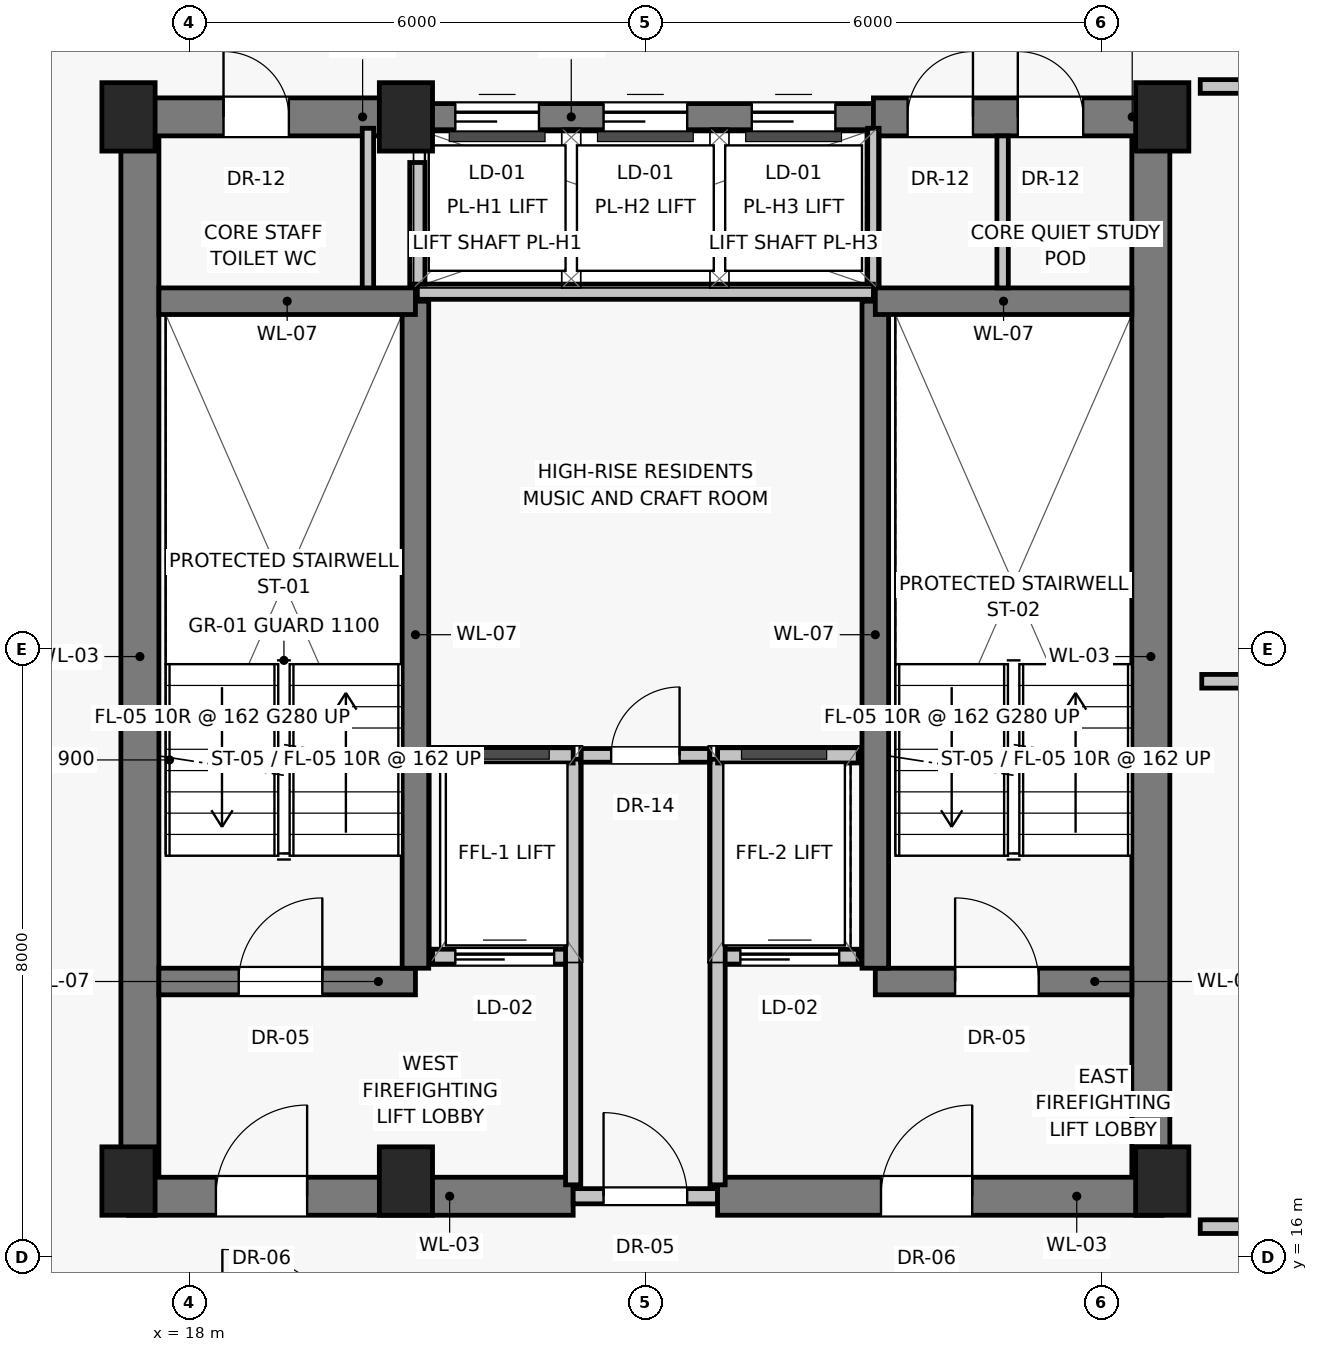
"""IFC4 building model, lengths in metres.
Left out: names, types, materials, properties, quantities, classifications, styles, units other than length and angle.
Written with IfcOpenShell. Run it as: python <this file> out.ifc"""

import sys

from ifc_helpers import new_model, si_unit, direction, frame, frame_2d, origin, origin_2d, place, context, subcontext, project, spatial, rectangle, extrude, source, transform, mapped, element, fill, save


model = new_model("IFC4")
c1 = context("Model", 3, precision=1e-05, world=origin(), true_north=direction((0.0, 1.0)))
c2 = subcontext(c1, "Body", "Model", "MODEL_VIEW")
j1 = project(units=[si_unit("LENGTHUNIT", "METRE"), si_unit("PLANEANGLEUNIT", "RADIAN")], contexts=[c1])
p1 = place(None, origin())
s1 = spatial("IfcSite", under=j1, at=p1, CompositionType="ELEMENT")
p2 = place(p1, origin())
s2 = spatial("IfcBuilding", under=s1, at=p2, CompositionType="ELEMENT")
p3 = place(p2, frame((0.0, 0.0, 244.75)))
s3 = spatial("IfcBuildingStorey", under=s2, at=p3, CompositionType="ELEMENT", Elevation=244.75)
for number, where, z_axis, x_axis in (
    (1, (17.2, 17.0, 0.0), (0.0, 0.0, 1.0), (1.0, 0.0, 0.0)),
    (2, (20.85, 17.0, 0.0), (0.0, 0.0, 1.0), (1.0, 0.0, 0.0)),
    (3, (30.8, 17.0, 0.0), (0.0, 0.0, 1.0), (1.0, 0.0, 0.0)),
    (4, (17.2, 31.0, 0.0), (0.0, 0.0, 1.0), (1.0, 0.0, 0.0)),
    (5, (20.85, 31.0, 0.0), (0.0, 0.0, 1.0), (1.0, 0.0, 0.0)),
    (6, (30.8, 31.0, 0.0), (0.0, 0.0, 1.0), (1.0, 0.0, 0.0)),
):
    element("IfcColumn", number, at=place(p3, frame(where, z_axis=z_axis, x_axis=x_axis)), inside=s3, PredefinedType="PILASTER", context=c2, shape_type="SweptSolid", body=[
        extrude(rectangle(XDim=0.7, YDim=0.9, at=origin_2d()), origin(), (0.0, 0.0, 1.0), 3.25),
    ])
for number, where, z_axis, x_axis in (
    (7, (17.35, 16.8, 0.0), (0.0, 0.0, 1.0), (0.0, 1.0, 0.0)),
    (8, (30.65, 16.8, 0.0), (0.0, 0.0, 1.0), (0.0, 1.0, 0.0)),
):
    element("IfcWall", number, at=place(p3, frame(where, z_axis=z_axis, x_axis=x_axis)), inside=s3, PredefinedType="SHEAR", context=c2, shape_type="SweptSolid", body=[
        extrude(rectangle(XDim=14.2, YDim=0.5, at=frame_2d((7.1, 0.0))), origin(), (0.0, 0.0, 1.0), 3.015),
    ])
p4 = place(p3, frame((17.2, 16.8, 0.0), z_axis=(0.0, 0.0, 1.0), x_axis=(1.0, 0.0, 0.0)))
e9 = element("IfcWall", 9, at=p4, inside=s3, PredefinedType="SHEAR", context=c2, shape_type="SweptSolid", body=[
    extrude(rectangle(XDim=5.85, YDim=0.5, at=frame_2d((2.925, 0.0))), origin(), (0.0, 0.0, 1.0), 3.015),
])
p5 = place(p4, frame((1.15, 0.0, 0.0)))
e10 = element("IfcOpeningElement", 10, at=p5, cuts=e9, PredefinedType="OPENING", context=c2, shape_type="SweptSolid", body=[
    extrude(rectangle(XDim=1.2, YDim=2.03, at=frame_2d((0.6, 1.015))), frame((0.0, 0.26, 0.0), z_axis=(0.0, -1.0, 0.0), x_axis=(1.0, 0.0, 0.0)), (0.0, 0.0, 1.0), 0.52),
])
p6 = place(p3, frame((23.05, 16.8, 0.0), z_axis=(0.0, 0.0, 1.0), x_axis=(1.0, 0.0, 0.0)))
e11 = element("IfcWall", 11, at=p6, inside=s3, PredefinedType="SOLIDWALL", context=c2, shape_type="SweptSolid", body=[
    extrude(rectangle(XDim=1.9, YDim=0.2, at=frame_2d((0.95, 0.0))), origin(), (0.0, 0.0, 1.0), 2.165),
])
p7 = place(p6, frame((0.4, 0.0, 0.0)))
e12 = element("IfcOpeningElement", 12, at=p7, cuts=e11, PredefinedType="OPENING", context=c2, shape_type="SweptSolid", body=[
    extrude(rectangle(XDim=1.1, YDim=2.03, at=frame_2d((0.55, 1.015))), frame((0.0, 0.11, 0.0), z_axis=(0.0, -1.0, 0.0), x_axis=(1.0, 0.0, 0.0)), (0.0, 0.0, 1.0), 0.22),
])
p8 = place(p3, frame((24.95, 16.8, 0.0), z_axis=(0.0, 0.0, 1.0), x_axis=(1.0, 0.0, 0.0)))
e13 = element("IfcWall", 13, at=p8, inside=s3, PredefinedType="SHEAR", context=c2, shape_type="SweptSolid", body=[
    extrude(rectangle(XDim=5.85, YDim=0.5, at=frame_2d((2.925, 0.0))), origin(), (0.0, 0.0, 1.0), 3.015),
])
p9 = place(p8, frame((2.15, 0.0, 0.0)))
e14 = element("IfcOpeningElement", 14, at=p9, cuts=e13, PredefinedType="OPENING", context=c2, shape_type="SweptSolid", body=[
    extrude(rectangle(XDim=1.2, YDim=2.03, at=frame_2d((0.6, 1.015))), frame((0.0, 0.26, 0.0), z_axis=(0.0, -1.0, 0.0), x_axis=(1.0, 0.0, 0.0)), (0.0, 0.0, 1.0), 0.52),
])
p10 = place(p3, frame((17.2, 31.0, 0.0), z_axis=(0.0, 0.0, 1.0), x_axis=(1.0, 0.0, 0.0)))
e15 = element("IfcWall", 15, at=p10, inside=s3, PredefinedType="SHEAR", context=c2, shape_type="SweptSolid", body=[
    extrude(rectangle(XDim=3.8, YDim=0.5, at=frame_2d((1.9, 0.0))), origin(), (0.0, 0.0, 1.0), 3.015),
])
p11 = place(p10, frame((1.25, 0.0, 0.0)))
e16 = element("IfcOpeningElement", 16, at=p11, cuts=e15, PredefinedType="OPENING", context=c2, shape_type="SweptSolid", body=[
    extrude(rectangle(XDim=0.86, YDim=2.01, at=frame_2d((0.43, 1.005))), frame((0.0, 0.26, 0.0), z_axis=(0.0, -1.0, 0.0), x_axis=(1.0, 0.0, 0.0)), (0.0, 0.0, 1.0), 0.52),
])
p12 = place(p3, frame((21.0, 31.0, 0.0), z_axis=(0.0, 0.0, 1.0), x_axis=(1.0, 0.0, 0.0)))
e17 = element("IfcWall", 17, at=p12, inside=s3, PredefinedType="SHEAR", context=c2, shape_type="SweptSolid", body=[
    extrude(rectangle(XDim=6.0, YDim=0.35, at=frame_2d((3.0, 0.0))), origin(), (0.0, 0.0, 1.0), 3.015),
])
p13 = place(p12, frame((0.5, 0.0, 0.0)))
e18 = element("IfcOpeningElement", 18, at=p13, cuts=e17, PredefinedType="OPENING", context=c2, shape_type="SweptSolid", body=[
    extrude(rectangle(XDim=1.1, YDim=2.08, at=frame_2d((0.55, 1.04))), frame((0.0, 0.185, 0.0), z_axis=(0.0, -1.0, 0.0), x_axis=(1.0, 0.0, 0.0)), (0.0, 0.0, 1.0), 0.37),
])
p14 = place(p12, frame((2.45, 0.0, 0.0)))
e19 = element("IfcOpeningElement", 19, at=p14, cuts=e17, PredefinedType="OPENING", context=c2, shape_type="SweptSolid", body=[
    extrude(rectangle(XDim=1.1, YDim=2.08, at=frame_2d((0.55, 1.04))), frame((0.0, 0.185, 0.0), z_axis=(0.0, -1.0, 0.0), x_axis=(1.0, 0.0, 0.0)), (0.0, 0.0, 1.0), 0.37),
])
p15 = place(p12, frame((4.4, 0.0, 0.0)))
e20 = element("IfcOpeningElement", 20, at=p15, cuts=e17, PredefinedType="OPENING", context=c2, shape_type="SweptSolid", body=[
    extrude(rectangle(XDim=1.1, YDim=2.08, at=frame_2d((0.55, 1.04))), frame((0.0, 0.185, 0.0), z_axis=(0.0, -1.0, 0.0), x_axis=(1.0, 0.0, 0.0)), (0.0, 0.0, 1.0), 0.37),
])
p16 = place(p3, frame((27.0, 31.0, 0.0), z_axis=(0.0, 0.0, 1.0), x_axis=(1.0, 0.0, 0.0)))
e21 = element("IfcWall", 21, at=p16, inside=s3, PredefinedType="SHEAR", context=c2, shape_type="SweptSolid", body=[
    extrude(rectangle(XDim=3.8, YDim=0.5, at=frame_2d((1.9, 0.0))), origin(), (0.0, 0.0, 1.0), 3.015),
])
p17 = place(p16, frame((0.45, 0.0, 0.0)))
e22 = element("IfcOpeningElement", 22, at=p17, cuts=e21, PredefinedType="OPENING", context=c2, shape_type="SweptSolid", body=[
    extrude(rectangle(XDim=0.86, YDim=2.01, at=frame_2d((0.43, 1.005))), frame((0.0, 0.26, 0.0), z_axis=(0.0, -1.0, 0.0), x_axis=(1.0, 0.0, 0.0)), (0.0, 0.0, 1.0), 0.52),
])
p18 = place(p16, frame((1.9, 0.0, 0.0)))
e23 = element("IfcOpeningElement", 23, at=p18, cuts=e21, PredefinedType="OPENING", context=c2, shape_type="SweptSolid", body=[
    extrude(rectangle(XDim=0.86, YDim=2.01, at=frame_2d((0.43, 1.005))), frame((0.0, 0.26, 0.0), z_axis=(0.0, -1.0, 0.0), x_axis=(1.0, 0.0, 0.0)), (0.0, 0.0, 1.0), 0.52),
])
for number, where, z_axis, x_axis in (
    (24, (20.35, 28.65, 0.0), (0.0, 0.0, 1.0), (0.0, 1.0, 0.0)),
    (25, (27.0, 28.65, 0.0), (0.0, 0.0, 1.0), (0.0, 1.0, 0.0)),
):
    element("IfcWall", number, at=place(p3, frame(where, z_axis=z_axis, x_axis=x_axis)), inside=s3, PredefinedType="PARTITIONING", context=c2, shape_type="SweptSolid", body=[
        extrude(rectangle(XDim=2.2, YDim=0.15, at=frame_2d((1.1, 0.0))), origin(), (0.0, 0.0, 1.0), 3.015),
    ])
p19 = place(p3, frame((17.6, 19.625, 0.0), z_axis=(0.0, 0.0, 1.0), x_axis=(1.0, 0.0, 0.0)))
e26 = element("IfcWall", 26, at=p19, inside=s3, PredefinedType="SHEAR", context=c2, shape_type="SweptSolid", body=[
    extrude(rectangle(XDim=3.375, YDim=0.35, at=frame_2d((1.688, 0.0))), origin(), (0.0, 0.0, 1.0), 3.015),
])
p20 = place(p19, frame((1.05, 0.0, 0.0)))
e27 = element("IfcOpeningElement", 27, at=p20, cuts=e26, PredefinedType="OPENING", context=c2, shape_type="SweptSolid", body=[
    extrude(rectangle(XDim=1.1, YDim=2.03, at=frame_2d((0.55, 1.015))), frame((0.0, 0.185, 0.0), z_axis=(0.0, -1.0, 0.0), x_axis=(1.0, 0.0, 0.0)), (0.0, 0.0, 1.0), 0.37),
])
p21 = place(p3, frame((21.2, 19.95, 0.0), z_axis=(0.0, 0.0, 1.0), x_axis=(1.0, 0.0, 0.0)))
e28 = element("IfcWall", 28, at=p21, inside=s3, PredefinedType="SOLIDWALL", context=c2, shape_type="SweptSolid", body=[
    extrude(rectangle(XDim=1.85, YDim=0.2, at=frame_2d((0.925, 0.0))), origin(), (0.0, 0.0, 1.0), 3.015),
])
p22 = place(p21, frame((0.3, 0.0, 0.0)))
e29 = element("IfcOpeningElement", 29, at=p22, cuts=e28, PredefinedType="OPENING", context=c2, shape_type="SweptSolid", body=[
    extrude(rectangle(XDim=1.3, YDim=2.25, at=frame_2d((0.65, 1.125))), frame((0.0, 0.11, 0.0), z_axis=(0.0, -1.0, 0.0), x_axis=(1.0, 0.0, 0.0)), (0.0, 0.0, 1.0), 0.22),
])
p23 = place(p3, frame((24.95, 19.95, 0.0), z_axis=(0.0, 0.0, 1.0), x_axis=(1.0, 0.0, 0.0)))
e30 = element("IfcWall", 30, at=p23, inside=s3, PredefinedType="SOLIDWALL", context=c2, shape_type="SweptSolid", body=[
    extrude(rectangle(XDim=1.85, YDim=0.2, at=frame_2d((0.925, 0.0))), origin(), (0.0, 0.0, 1.0), 3.015),
])
p24 = place(p23, frame((0.3, 0.0, 0.0)))
e31 = element("IfcOpeningElement", 31, at=p24, cuts=e30, PredefinedType="OPENING", context=c2, shape_type="SweptSolid", body=[
    extrude(rectangle(XDim=1.3, YDim=2.25, at=frame_2d((0.65, 1.125))), frame((0.0, 0.11, 0.0), z_axis=(0.0, -1.0, 0.0), x_axis=(1.0, 0.0, 0.0)), (0.0, 0.0, 1.0), 0.22),
])
p25 = place(p3, frame((27.025, 19.625, 0.0), z_axis=(0.0, 0.0, 1.0), x_axis=(1.0, 0.0, 0.0)))
e32 = element("IfcWall", 32, at=p25, inside=s3, PredefinedType="SHEAR", context=c2, shape_type="SweptSolid", body=[
    extrude(rectangle(XDim=3.375, YDim=0.35, at=frame_2d((1.688, 0.0))), origin(), (0.0, 0.0, 1.0), 3.015),
])
p26 = place(p25, frame((1.05, 0.0, 0.0)))
e33 = element("IfcOpeningElement", 33, at=p26, cuts=e32, PredefinedType="OPENING", context=c2, shape_type="SweptSolid", body=[
    extrude(rectangle(XDim=1.1, YDim=2.03, at=frame_2d((0.55, 1.015))), frame((0.0, 0.185, 0.0), z_axis=(0.0, -1.0, 0.0), x_axis=(1.0, 0.0, 0.0)), (0.0, 0.0, 1.0), 0.37),
])
for number, where, z_axis, x_axis in (
    (34, (20.975, 19.8, 0.0), (0.0, 0.0, 1.0), (0.0, 1.0, 0.0)),
    (35, (27.025, 19.8, 0.0), (0.0, 0.0, 1.0), (0.0, 1.0, 0.0)),
):
    element("IfcWall", number, at=place(p3, frame(where, z_axis=z_axis, x_axis=x_axis)), inside=s3, PredefinedType="SHEAR", context=c2, shape_type="SweptSolid", body=[
        extrude(rectangle(XDim=8.775, YDim=0.35, at=frame_2d((4.387, 0.0))), origin(), (0.0, 0.0, 1.0), 3.015),
    ])
for number, where, z_axis, x_axis in (
    (36, (17.6, 28.575, 0.0), (0.0, 0.0, 1.0), (1.0, 0.0, 0.0)),
    (37, (27.025, 28.575, 0.0), (0.0, 0.0, 1.0), (1.0, 0.0, 0.0)),
):
    element("IfcWall", number, at=place(p3, frame(where, z_axis=z_axis, x_axis=x_axis)), inside=s3, PredefinedType="SHEAR", context=c2, shape_type="SweptSolid", body=[
        extrude(rectangle(XDim=3.375, YDim=0.35, at=frame_2d((1.688, 0.0))), origin(), (0.0, 0.0, 1.0), 3.015),
    ])
for number, where, z_axis, x_axis in (
    (38, (23.05, 16.95, 0.0), (0.0, 0.0, 1.0), (0.0, 1.0, 0.0)),
    (39, (24.95, 16.95, 0.0), (0.0, 0.0, 1.0), (0.0, 1.0, 0.0)),
):
    element("IfcWall", number, at=place(p3, frame(where, z_axis=z_axis, x_axis=x_axis)), inside=s3, PredefinedType="SOLIDWALL", context=c2, shape_type="SweptSolid", body=[
        extrude(rectangle(XDim=5.6, YDim=0.2, at=frame_2d((2.8, 0.0))), origin(), (0.0, 0.0, 1.0), 3.015),
    ])
for number, where, z_axis, x_axis in (
    (40, (21.2, 22.6, 0.0), (0.0, 0.0, 1.0), (1.0, 0.0, 0.0)),
    (41, (24.95, 22.6, 0.0), (0.0, 0.0, 1.0), (1.0, 0.0, 0.0)),
):
    element("IfcWall", number, at=place(p3, frame(where, z_axis=z_axis, x_axis=x_axis)), inside=s3, PredefinedType="SOLIDWALL", context=c2, shape_type="SweptSolid", body=[
        extrude(rectangle(XDim=1.85, YDim=0.2, at=frame_2d((0.925, 0.0))), origin(), (0.0, 0.0, 1.0), 3.015),
    ])
p27 = place(p3, frame((21.0, 28.7, 0.0), z_axis=(0.0, 0.0, 1.0), x_axis=(1.0, 0.0, 0.0)))
e42 = element("IfcWall", 42, at=p27, inside=s3, PredefinedType="SOLIDWALL", context=c2, shape_type="SweptSolid", body=[
    extrude(rectangle(XDim=6.0, YDim=0.2, at=frame_2d((3.0, 0.0))), origin(), (0.0, 0.0, 1.0), 3.015),
])
p28 = place(p3, frame((21.0, 28.8, 0.0), z_axis=(0.0, 0.0, 1.0), x_axis=(0.0, 1.0, 0.0)))
e43 = element("IfcWall", 43, at=p28, inside=s3, PredefinedType="SOLIDWALL", context=c2, shape_type="SweptSolid", body=[
    extrude(rectangle(XDim=1.6, YDim=0.2, at=frame_2d((0.8, 0.0))), origin(), (0.0, 0.0, 1.0), 3.015),
])
p29 = place(p3, frame((23.15, 22.6, 0.0), z_axis=(0.0, 0.0, 1.0), x_axis=(1.0, 0.0, 0.0)))
e44 = element("IfcWall", 44, at=p29, inside=s3, PredefinedType="PARTITIONING", context=c2, shape_type="SweptSolid", body=[
    extrude(rectangle(XDim=1.7, YDim=0.18, at=frame_2d((0.85, 0.0))), origin(), (0.0, 0.0, 1.0), 3.015),
])
p30 = place(p29, frame((0.4, 0.0, 0.0)))
e45 = element("IfcOpeningElement", 45, at=p30, cuts=e44, PredefinedType="OPENING", context=c2, shape_type="SweptSolid", body=[
    extrude(rectangle(XDim=0.9, YDim=2.01, at=frame_2d((0.45, 1.005))), frame((0.0, 0.1, 0.0), z_axis=(0.0, -1.0, 0.0), x_axis=(1.0, 0.0, 0.0)), (0.0, 0.0, 1.0), 0.2),
])
p31 = place(p3, frame((28.7, 28.75, 0.0), z_axis=(0.0, 0.0, 1.0), x_axis=(0.0, 1.0, 0.0)))
e46 = element("IfcWall", 46, at=p31, inside=s3, PredefinedType="PARTITIONING", context=c2, shape_type="SweptSolid", body=[
    extrude(rectangle(XDim=2.0, YDim=0.15, at=frame_2d((1.0, 0.0))), origin(), (0.0, 0.0, 1.0), 3.015),
])
p32 = place(p3, frame((31.32, 23.575, 0.0), z_axis=(0.0, 0.0, 1.0), x_axis=(1.0, 0.0, 0.0)))
e47 = element("IfcWall", 47, at=p32, inside=s3, PredefinedType="PARTITIONING", context=c2, shape_type="SweptSolid", body=[
    extrude(rectangle(XDim=9.362, YDim=0.18, at=frame_2d((4.681, 0.0))), origin(), (0.0, 0.0, 1.0), 3.015),
])
p33 = place(p3, frame((31.3, 16.4, 0.0), z_axis=(0.0, 0.0, 1.0), x_axis=(1.0, 0.0, 0.0)))
e48 = element("IfcWall", 48, at=p33, inside=s3, PredefinedType="PARTITIONING", context=c2, shape_type="SweptSolid", body=[
    extrude(rectangle(XDim=1.92, YDim=0.18, at=frame_2d((0.96, 0.0))), origin(), (0.0, 0.0, 1.0), 3.015),
])
p34 = place(p33, frame((0.72, 0.0, 0.0)))
e49 = element("IfcOpeningElement", 49, at=p34, cuts=e48, PredefinedType="OPENING", context=c2, shape_type="SweptSolid", body=[
    extrude(rectangle(XDim=1.0, YDim=2.01, at=frame_2d((0.5, 1.005))), frame((0.0, 0.1, 0.0), z_axis=(0.0, -1.0, 0.0), x_axis=(1.0, 0.0, 0.0)), (0.0, 0.0, 1.0), 0.2),
])
p35 = place(p3, frame((31.3, 31.4, 0.0), z_axis=(0.0, 0.0, 1.0), x_axis=(1.0, 0.0, 0.0)))
e50 = element("IfcWall", 50, at=p35, inside=s3, PredefinedType="PARTITIONING", context=c2, shape_type="SweptSolid", body=[
    extrude(rectangle(XDim=1.92, YDim=0.18, at=frame_2d((0.96, 0.0))), origin(), (0.0, 0.0, 1.0), 3.015),
])
p36 = place(p35, frame((0.72, 0.0, 0.0)))
e51 = element("IfcOpeningElement", 51, at=p36, cuts=e50, PredefinedType="OPENING", context=c2, shape_type="SweptSolid", body=[
    extrude(rectangle(XDim=1.0, YDim=2.01, at=frame_2d((0.5, 1.005))), frame((0.0, 0.1, 0.0), z_axis=(0.0, -1.0, 0.0), x_axis=(1.0, 0.0, 0.0)), (0.0, 0.0, 1.0), 0.2),
])
m1 = source(origin(), c2, "Body", "SweptSolid", [
    extrude(rectangle(XDim=1.2, YDim=2.03, at=frame_2d((0.6, 1.015))), frame((0.0, 0.025, 0.0), z_axis=(0.0, -1.0, 0.0), x_axis=(1.0, 0.0, 0.0)), (0.0, 0.0, 1.0), 0.05),
])
p37 = place(p5, origin())
e52 = element("IfcDoor", 52, at=p37, inside=s3, OperationType="SINGLE_SWING_RIGHT", PredefinedType="DOOR", context=c2, shape_type="MappedRepresentation", body=[
    mapped(m1, transform((0.0, 0.0, 0.0), scale=1.0)),
])
fill(e10, e52)
m2 = source(origin(), c2, "Body", "SweptSolid", [
    extrude(rectangle(XDim=1.1, YDim=2.03, at=frame_2d((0.55, 1.015))), frame((0.0, 0.025, 0.0), z_axis=(0.0, -1.0, 0.0), x_axis=(1.0, 0.0, 0.0)), (0.0, 0.0, 1.0), 0.05),
])
p38 = place(p7, origin())
e53 = element("IfcDoor", 53, at=p38, inside=s3, OperationType="SINGLE_SWING_LEFT", PredefinedType="DOOR", context=c2, shape_type="MappedRepresentation", body=[
    mapped(m2, transform((0.0, 0.0, 0.0), scale=1.0)),
])
fill(e12, e53)
p39 = place(p9, origin())
e54 = element("IfcDoor", 54, at=p39, inside=s3, OperationType="SINGLE_SWING_RIGHT", PredefinedType="DOOR", context=c2, shape_type="MappedRepresentation", body=[
    mapped(m1, transform((0.0, 0.0, 0.0), scale=1.0)),
])
fill(e14, e54)
m3 = source(origin(), c2, "Body", "SweptSolid", [
    extrude(rectangle(XDim=0.86, YDim=2.01, at=frame_2d((0.43, 1.005))), frame((0.0, 0.025, 0.0), z_axis=(0.0, -1.0, 0.0), x_axis=(1.0, 0.0, 0.0)), (0.0, 0.0, 1.0), 0.05),
])
p40 = place(p11, origin())
e55 = element("IfcDoor", 55, at=p40, inside=s3, OperationType="SINGLE_SWING_LEFT", PredefinedType="DOOR", context=c2, shape_type="MappedRepresentation", body=[
    mapped(m3, transform((0.0, 0.0, 0.0), scale=1.0)),
])
fill(e16, e55)
m4 = source(origin(), c2, "Body", "SweptSolid", [
    extrude(rectangle(XDim=1.1, YDim=2.08, at=frame_2d((0.55, 1.04))), frame((0.0, 0.025, 0.0), z_axis=(0.0, -1.0, 0.0), x_axis=(1.0, 0.0, 0.0)), (0.0, 0.0, 1.0), 0.05),
])
p41 = place(p13, origin())
e56 = element("IfcDoor", 56, at=p41, inside=s3, OperationType="SLIDING_TO_LEFT", PredefinedType="DOOR", context=c2, shape_type="MappedRepresentation", body=[
    mapped(m4, transform((0.0, 0.0, 0.0), scale=1.0)),
])
fill(e18, e56)
p42 = place(p14, origin())
e57 = element("IfcDoor", 57, at=p42, inside=s3, OperationType="SLIDING_TO_LEFT", PredefinedType="DOOR", context=c2, shape_type="MappedRepresentation", body=[
    mapped(m4, transform((0.0, 0.0, 0.0), scale=1.0)),
])
fill(e19, e57)
p43 = place(p15, origin())
e58 = element("IfcDoor", 58, at=p43, inside=s3, OperationType="SLIDING_TO_LEFT", PredefinedType="DOOR", context=c2, shape_type="MappedRepresentation", body=[
    mapped(m4, transform((0.0, 0.0, 0.0), scale=1.0)),
])
fill(e20, e58)
p44 = place(p17, origin())
e59 = element("IfcDoor", 59, at=p44, inside=s3, OperationType="SINGLE_SWING_RIGHT", PredefinedType="DOOR", context=c2, shape_type="MappedRepresentation", body=[
    mapped(m3, transform((0.0, 0.0, 0.0), scale=1.0)),
])
fill(e22, e59)
p45 = place(p18, origin())
e60 = element("IfcDoor", 60, at=p45, inside=s3, OperationType="SINGLE_SWING_LEFT", PredefinedType="DOOR", context=c2, shape_type="MappedRepresentation", body=[
    mapped(m3, transform((0.0, 0.0, 0.0), scale=1.0)),
])
fill(e23, e60)
p46 = place(p20, origin())
e61 = element("IfcDoor", 61, at=p46, inside=s3, OperationType="SINGLE_SWING_RIGHT", PredefinedType="DOOR", context=c2, shape_type="MappedRepresentation", body=[
    mapped(m2, transform((0.0, 0.0, 0.0), scale=1.0)),
])
fill(e27, e61)
m5 = source(origin(), c2, "Body", "SweptSolid", [
    extrude(rectangle(XDim=1.3, YDim=2.25, at=frame_2d((0.65, 1.125))), frame((0.0, 0.025, 0.0), z_axis=(0.0, -1.0, 0.0), x_axis=(1.0, 0.0, 0.0)), (0.0, 0.0, 1.0), 0.05),
])
p47 = place(p22, origin())
e62 = element("IfcDoor", 62, at=p47, inside=s3, OperationType="SLIDING_TO_LEFT", PredefinedType="DOOR", context=c2, shape_type="MappedRepresentation", body=[
    mapped(m5, transform((0.0, 0.0, 0.0), scale=1.0)),
])
fill(e29, e62)
p48 = place(p24, origin())
e63 = element("IfcDoor", 63, at=p48, inside=s3, OperationType="SLIDING_TO_LEFT", PredefinedType="DOOR", context=c2, shape_type="MappedRepresentation", body=[
    mapped(m5, transform((0.0, 0.0, 0.0), scale=1.0)),
])
fill(e31, e63)
p49 = place(p26, origin())
e64 = element("IfcDoor", 64, at=p49, inside=s3, OperationType="SINGLE_SWING_LEFT", PredefinedType="DOOR", context=c2, shape_type="MappedRepresentation", body=[
    mapped(m2, transform((0.0, 0.0, 0.0), scale=1.0)),
])
fill(e33, e64)
m6 = source(origin(), c2, "Body", "SweptSolid", [
    extrude(rectangle(XDim=0.9, YDim=2.01, at=frame_2d((0.45, 1.005))), frame((0.0, 0.025, 0.0), z_axis=(0.0, -1.0, 0.0), x_axis=(1.0, 0.0, 0.0)), (0.0, 0.0, 1.0), 0.05),
])
p50 = place(p30, origin())
e65 = element("IfcDoor", 65, at=p50, inside=s3, OperationType="SINGLE_SWING_RIGHT", PredefinedType="DOOR", context=c2, shape_type="MappedRepresentation", body=[
    mapped(m6, transform((0.0, 0.0, 0.0), scale=1.0)),
])
fill(e45, e65)
save(model, sys.argv[1])
